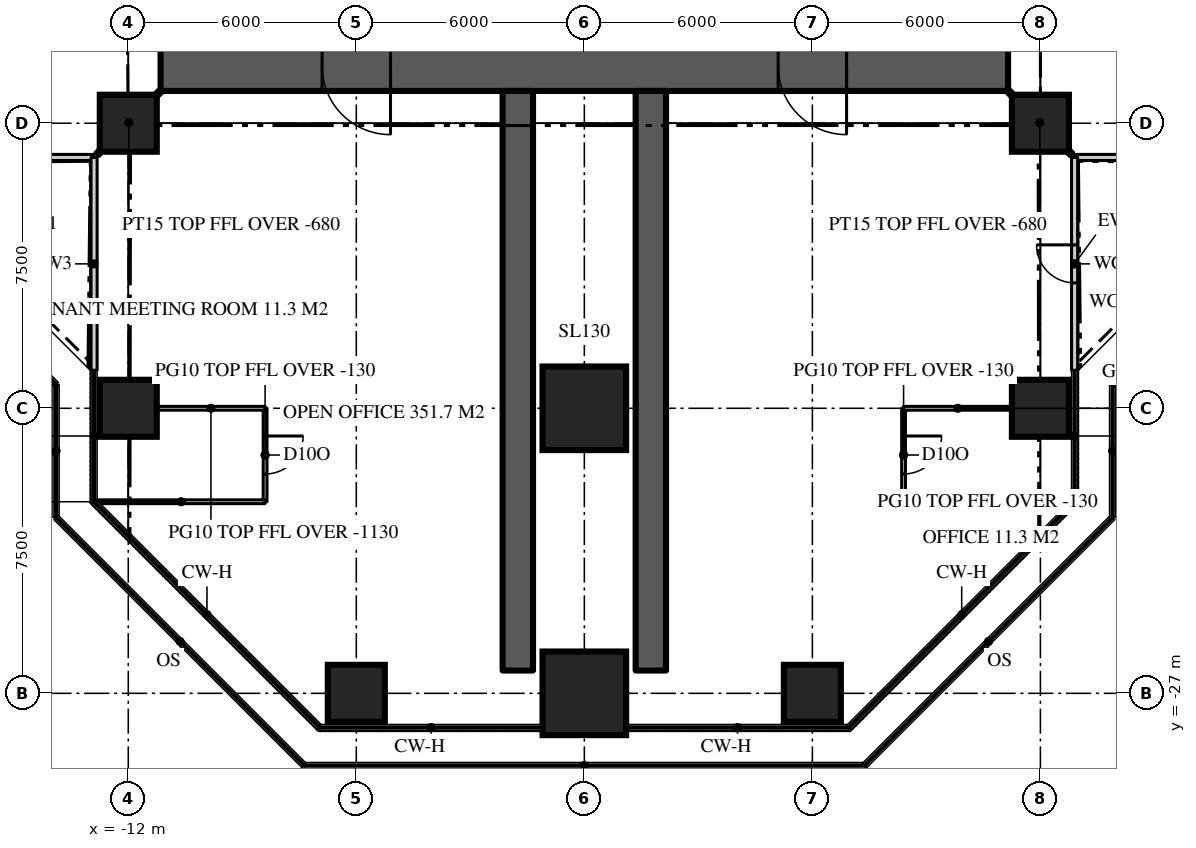
"""IFC4 building model, lengths in metres.
Left out: names, types, materials, properties, quantities, classifications, styles, units other than length and angle.
Written with IfcOpenShell. Run it as: python <this file> out.ifc"""

import sys

from ifc_helpers import new_model, si_unit, direction, frame, frame_2d, origin, origin_2d, place, context, subcontext, project, spatial, rectangle, extrude, element, fill, save


model = new_model("IFC4")
c1 = context("Model", 3, precision=1e-05, world=origin(), true_north=direction((0.0, 1.0)))
c2 = subcontext(c1, "Body", "Model", "MODEL_VIEW")
j1 = project(units=[si_unit("LENGTHUNIT", "METRE"), si_unit("PLANEANGLEUNIT", "RADIAN")], contexts=[c1])
p1 = place(None, origin())
s1 = spatial("IfcSite", under=j1, at=p1, CompositionType="ELEMENT")
p2 = place(p1, origin())
s2 = spatial("IfcBuilding", under=s1, at=p2, CompositionType="ELEMENT")
p3 = place(p2, frame((0.0, 0.0, 259.5)))
s3 = spatial("IfcBuildingStorey", under=s2, at=p3, CompositionType="ELEMENT", Elevation=259.5)
p4 = place(p3, frame((11.15, -10.5, 0.0), z_axis=(0.0, 0.0, 1.0), x_axis=(-1.0, 0.0, 0.0)))
e1 = element("IfcWall", 1, at=p4, inside=s3, PredefinedType="SHEAR", context=c2, shape_type="SweptSolid", body=[
    extrude(rectangle(XDim=22.3, YDim=1.3, at=frame_2d((11.15, 0.0))), origin(), (0.0, 0.0, 1.0), 3.9),
])
p5 = place(p4, frame((16.25, 0.0, 0.0)))
e2 = element("IfcOpeningElement", 2, at=p5, cuts=e1, PredefinedType="OPENING", context=c2, shape_type="SweptSolid", body=[
    extrude(rectangle(XDim=1.8, YDim=2.2, at=frame_2d((0.9, 1.1))), frame((0.0, 0.66, 0.0), z_axis=(0.0, -1.0, 0.0), x_axis=(1.0, 0.0, 0.0)), (0.0, 0.0, 1.0), 1.32),
])
p6 = place(p4, frame((4.25, 0.0, 0.0)))
e3 = element("IfcOpeningElement", 3, at=p6, cuts=e1, PredefinedType="OPENING", context=c2, shape_type="SweptSolid", body=[
    extrude(rectangle(XDim=1.8, YDim=2.2, at=frame_2d((0.9, 1.1))), frame((0.0, 0.66, 0.0), z_axis=(0.0, -1.0, 0.0), x_axis=(1.0, 0.0, 0.0)), (0.0, 0.0, 1.0), 1.32),
])
for number, where, z_axis, x_axis in (
    (4, (-1.75, -11.15, 0.0), (0.0, 0.0, 1.0), (0.0, -1.0, 0.0)),
    (5, (1.75, -11.15, 0.0), (0.0, 0.0, 1.0), (0.0, -1.0, 0.0)),
):
    element("IfcWall", number, at=place(p3, frame(where, z_axis=z_axis, x_axis=x_axis)), inside=s3, PredefinedType="SHEAR", context=c2, shape_type="SweptSolid", body=[
        extrude(rectangle(XDim=15.25, YDim=0.8, at=frame_2d((7.625, 0.0))), origin(), (0.0, 0.0, 1.0), 3.9),
    ])
p7 = place(p3, frame((-6.0, -27.0, 0.0), z_axis=(0.0, 0.0, 1.0), x_axis=(1.0, 0.0, 0.0)))
e6 = element("IfcColumn", 6, at=p7, inside=s3, PredefinedType="COLUMN", context=c2, shape_type="SweptSolid", body=[
    extrude(rectangle(XDim=1.5, YDim=1.5, at=origin_2d()), origin(), (0.0, 0.0, 1.0), 3.9),
])
p8 = place(p3, frame((0.0, -27.0, 0.0), z_axis=(0.0, 0.0, 1.0), x_axis=(1.0, 0.0, 0.0)))
e7 = element("IfcColumn", 7, at=p8, inside=s3, PredefinedType="COLUMN", context=c2, shape_type="SweptSolid", body=[
    extrude(rectangle(XDim=2.2, YDim=2.2, at=origin_2d()), origin(), (0.0, 0.0, 1.0), 3.9),
])
for number, where, z_axis, x_axis in (
    (8, (6.0, -27.0, 0.0), (0.0, 0.0, 1.0), (1.0, 0.0, 0.0)),
    (9, (-12.0, -19.5, 0.0), (0.0, 0.0, 1.0), (1.0, 0.0, 0.0)),
):
    element("IfcColumn", number, at=place(p3, frame(where, z_axis=z_axis, x_axis=x_axis)), inside=s3, PredefinedType="COLUMN", context=c2, shape_type="SweptSolid", body=[
        extrude(rectangle(XDim=1.5, YDim=1.5, at=origin_2d()), origin(), (0.0, 0.0, 1.0), 3.9),
    ])
p9 = place(p3, frame((0.0, -19.5, 0.0), z_axis=(0.0, 0.0, 1.0), x_axis=(1.0, 0.0, 0.0)))
e10 = element("IfcColumn", 10, at=p9, inside=s3, PredefinedType="COLUMN", context=c2, shape_type="SweptSolid", body=[
    extrude(rectangle(XDim=2.2, YDim=2.2, at=origin_2d()), origin(), (0.0, 0.0, 1.0), 3.9),
])
for number, where, z_axis, x_axis in (
    (11, (12.0, -19.5, 0.0), (0.0, 0.0, 1.0), (1.0, 0.0, 0.0)),
    (12, (-12.0, -12.0, 0.0), (0.0, 0.0, 1.0), (1.0, 0.0, 0.0)),
    (13, (12.0, -12.0, 0.0), (0.0, 0.0, 1.0), (1.0, 0.0, 0.0)),
):
    element("IfcColumn", number, at=place(p3, frame(where, z_axis=z_axis, x_axis=x_axis)), inside=s3, PredefinedType="COLUMN", context=c2, shape_type="SweptSolid", body=[
        extrude(rectangle(XDim=1.5, YDim=1.5, at=origin_2d()), origin(), (0.0, 0.0, 1.0), 3.9),
    ])
p10 = place(p3, frame((12.9, -12.9, 0.0), z_axis=(0.0, 0.0, 1.0), x_axis=(1.0, 0.0, 0.0)))
e14 = element("IfcWall", 14, at=p10, inside=s3, PredefinedType="SOLIDWALL", context=c2, shape_type="SweptSolid", body=[
    extrude(rectangle(XDim=5.6, YDim=0.16, at=frame_2d((2.8, 0.0))), origin(), (0.0, 0.0, 1.0), 3.77),
])
p11 = place(p3, frame((-18.5, -12.9, 0.0), z_axis=(0.0, 0.0, 1.0), x_axis=(1.0, 0.0, 0.0)))
e15 = element("IfcWall", 15, at=p11, inside=s3, PredefinedType="SOLIDWALL", context=c2, shape_type="SweptSolid", body=[
    extrude(rectangle(XDim=5.6, YDim=0.16, at=frame_2d((2.8, 0.0))), origin(), (0.0, 0.0, 1.0), 3.77),
])
p12 = place(p11, frame((2.3, 0.0, 0.0)))
e16 = element("IfcOpeningElement", 16, at=p12, cuts=e15, PredefinedType="OPENING", context=c2, shape_type="SweptSolid", body=[
    extrude(rectangle(XDim=1.0, YDim=2.2, at=frame_2d((0.5, 1.1))), frame((0.0, 0.09, 0.0), z_axis=(0.0, -1.0, 0.0), x_axis=(1.0, 0.0, 0.0)), (0.0, 0.0, 1.0), 0.18),
])
p13 = place(p3, frame((-12.9, -12.9, 0.0), z_axis=(0.0, 0.0, 1.0), x_axis=(0.0, -1.0, 0.0)))
e17 = element("IfcWall", 17, at=p13, inside=s3, PredefinedType="SOLIDWALL", context=c2, shape_type="SweptSolid", body=[
    extrude(rectangle(XDim=5.6, YDim=0.16, at=frame_2d((2.8, 0.0))), origin(), (0.0, 0.0, 1.0), 3.77),
])
p14 = place(p3, frame((12.9, -18.5, 0.0), z_axis=(0.0, 0.0, 1.0), x_axis=(0.0, 1.0, 0.0)))
e18 = element("IfcWall", 18, at=p14, inside=s3, PredefinedType="SOLIDWALL", context=c2, shape_type="SweptSolid", body=[
    extrude(rectangle(XDim=5.6, YDim=0.16, at=frame_2d((2.8, 0.0))), origin(), (0.0, 0.0, 1.0), 3.77),
])
p15 = place(p14, frame((2.3, 0.0, 0.0)))
e19 = element("IfcOpeningElement", 19, at=p15, cuts=e18, PredefinedType="OPENING", context=c2, shape_type="SweptSolid", body=[
    extrude(rectangle(XDim=1.0, YDim=2.2, at=frame_2d((0.5, 1.1))), frame((0.0, 0.09, 0.0), z_axis=(0.0, -1.0, 0.0), x_axis=(1.0, 0.0, 0.0)), (0.0, 0.0, 1.0), 0.18),
])
p16 = place(p3, frame((8.4, -19.5, 0.0), z_axis=(0.0, 0.0, 1.0), x_axis=(0.0, -1.0, 0.0)))
e20 = element("IfcWall", 20, at=p16, inside=s3, PredefinedType="PARTITIONING", context=c2, shape_type="SweptSolid", body=[
    extrude(rectangle(XDim=2.459, YDim=0.1, at=frame_2d((1.229, 0.0))), origin(), (0.0, 0.0, 1.0), 3.77),
])
p17 = place(p16, frame((0.729, 0.0, 0.0)))
e21 = element("IfcOpeningElement", 21, at=p17, cuts=e20, PredefinedType="OPENING", context=c2, shape_type="SweptSolid", body=[
    extrude(rectangle(XDim=1.0, YDim=2.2, at=frame_2d((0.5, 1.1))), frame((0.0, 0.06, 0.0), z_axis=(0.0, -1.0, 0.0), x_axis=(1.0, 0.0, 0.0)), (0.0, 0.0, 1.0), 0.12),
])
p18 = place(p3, frame((8.4, -19.5, 0.0), z_axis=(0.0, 0.0, 1.0), x_axis=(1.0, 0.0, 0.0)))
e22 = element("IfcWall", 22, at=p18, inside=s3, PredefinedType="PARTITIONING", context=c2, shape_type="SweptSolid", body=[
    extrude(rectangle(XDim=2.85, YDim=0.1, at=frame_2d((1.425, 0.0))), origin(), (0.0, 0.0, 1.0), 2.77),
])
p19 = place(p3, frame((8.4, -21.959, 0.0), z_axis=(0.0, 0.0, 1.0), x_axis=(1.0, 0.0, 0.0)))
e23 = element("IfcWall", 23, at=p19, inside=s3, PredefinedType="PARTITIONING", context=c2, shape_type="SweptSolid", body=[
    extrude(rectangle(XDim=4.42, YDim=0.1, at=frame_2d((2.21, 0.0))), origin(), (0.0, 0.0, 1.0), 3.77),
])
p20 = place(p3, frame((-8.4, -19.5, 0.0), z_axis=(0.0, 0.0, 1.0), x_axis=(0.0, -1.0, 0.0)))
e24 = element("IfcWall", 24, at=p20, inside=s3, PredefinedType="PARTITIONING", context=c2, shape_type="SweptSolid", body=[
    extrude(rectangle(XDim=2.459, YDim=0.1, at=frame_2d((1.229, 0.0))), origin(), (0.0, 0.0, 1.0), 3.77),
])
p21 = place(p20, frame((0.729, 0.0, 0.0)))
e25 = element("IfcOpeningElement", 25, at=p21, cuts=e24, PredefinedType="OPENING", context=c2, shape_type="SweptSolid", body=[
    extrude(rectangle(XDim=1.0, YDim=2.2, at=frame_2d((0.5, 1.1))), frame((0.0, 0.06, 0.0), z_axis=(0.0, -1.0, 0.0), x_axis=(1.0, 0.0, 0.0)), (0.0, 0.0, 1.0), 0.12),
])
p22 = place(p3, frame((-8.4, -19.5, 0.0), z_axis=(0.0, 0.0, 1.0), x_axis=(-1.0, 0.0, 0.0)))
e26 = element("IfcWall", 26, at=p22, inside=s3, PredefinedType="PARTITIONING", context=c2, shape_type="SweptSolid", body=[
    extrude(rectangle(XDim=2.85, YDim=0.1, at=frame_2d((1.425, 0.0))), origin(), (0.0, 0.0, 1.0), 2.77),
])
p23 = place(p3, frame((-8.4, -21.959, 0.0), z_axis=(0.0, 0.0, 1.0), x_axis=(-1.0, 0.0, 0.0)))
e27 = element("IfcWall", 27, at=p23, inside=s3, PredefinedType="PARTITIONING", context=c2, shape_type="SweptSolid", body=[
    extrude(rectangle(XDim=4.42, YDim=0.1, at=frame_2d((2.21, 0.0))), origin(), (0.0, 0.0, 1.0), 3.77),
])
for number, where, z_axis, x_axis in (
    (28, (-11.15, -11.15, 0.0), (0.0, 0.0, 1.0), (-0.707, -0.707, 0.0)),
    (29, (11.15, -11.15, 0.0), (0.0, 0.0, 1.0), (0.707, -0.707, 0.0)),
):
    element("IfcWall", number, at=place(p3, frame(where, z_axis=z_axis, x_axis=x_axis)), inside=s3, PredefinedType="PARTITIONING", context=c2, shape_type="SweptSolid", body=[
        extrude(rectangle(XDim=2.362, YDim=0.15, at=frame_2d((1.181, 0.0))), origin(), (0.0, 0.0, 1.0), 3.22),
    ])
p24 = place(p15, origin())
e30 = element("IfcDoor", 30, at=p24, inside=s3, OperationType="SINGLE_SWING_RIGHT", PredefinedType="DOOR", context=c2, shape_type="SweptSolid", body=[
    extrude(rectangle(XDim=1.0, YDim=2.2, at=frame_2d((0.5, 1.1))), frame((0.0, 0.025, 0.0), z_axis=(0.0, -1.0, 0.0), x_axis=(1.0, 0.0, 0.0)), (0.0, 0.0, 1.0), 0.05),
])
fill(e19, e30)
p25 = place(p5, origin())
e31 = element("IfcDoor", 31, at=p25, inside=s3, OperationType="DOUBLE_DOOR_DOUBLE_SWING", PredefinedType="DOOR", context=c2, shape_type="SweptSolid", body=[
    extrude(rectangle(XDim=1.8, YDim=2.2, at=frame_2d((0.9, 1.1))), frame((0.0, 0.025, 0.0), z_axis=(0.0, -1.0, 0.0), x_axis=(1.0, 0.0, 0.0)), (0.0, 0.0, 1.0), 0.05),
])
fill(e2, e31)
p26 = place(p6, origin())
e32 = element("IfcDoor", 32, at=p26, inside=s3, OperationType="DOUBLE_DOOR_DOUBLE_SWING", PredefinedType="DOOR", context=c2, shape_type="SweptSolid", body=[
    extrude(rectangle(XDim=1.8, YDim=2.2, at=frame_2d((0.9, 1.1))), frame((0.0, 0.025, 0.0), z_axis=(0.0, -1.0, 0.0), x_axis=(1.0, 0.0, 0.0)), (0.0, 0.0, 1.0), 0.05),
])
fill(e3, e32)
p27 = place(p17, origin())
e33 = element("IfcDoor", 33, at=p27, inside=s3, OperationType="SINGLE_SWING_LEFT", PredefinedType="DOOR", context=c2, shape_type="SweptSolid", body=[
    extrude(rectangle(XDim=1.0, YDim=2.2, at=frame_2d((0.5, 1.1))), frame((0.0, 0.025, 0.0), z_axis=(0.0, -1.0, 0.0), x_axis=(1.0, 0.0, 0.0)), (0.0, 0.0, 1.0), 0.05),
])
fill(e21, e33)
p28 = place(p21, origin())
e34 = element("IfcDoor", 34, at=p28, inside=s3, OperationType="SINGLE_SWING_LEFT", PredefinedType="DOOR", context=c2, shape_type="SweptSolid", body=[
    extrude(rectangle(XDim=1.0, YDim=2.2, at=frame_2d((0.5, 1.1))), frame((0.0, 0.025, 0.0), z_axis=(0.0, -1.0, 0.0), x_axis=(1.0, 0.0, 0.0)), (0.0, 0.0, 1.0), 0.05),
])
fill(e25, e34)
save(model, sys.argv[1])
